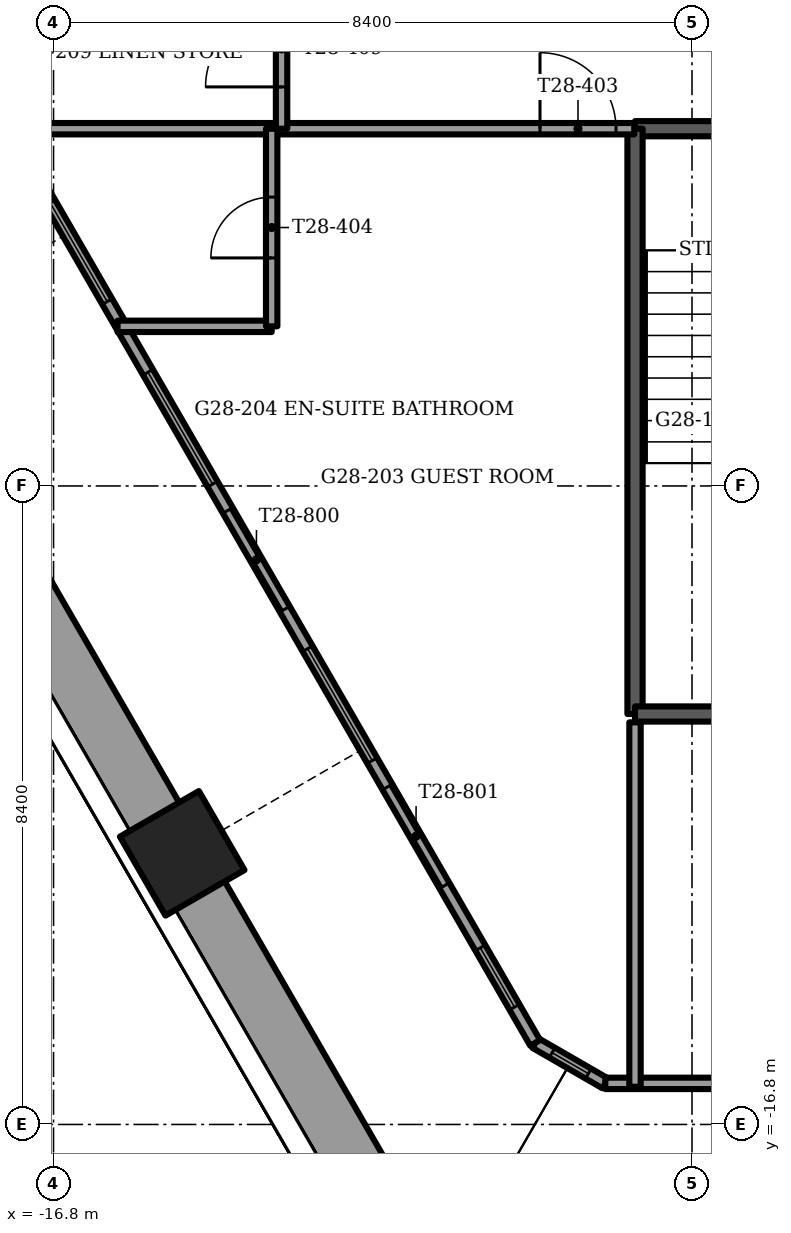
"""IFC4 building model, lengths in metres.
Left out: names, types, materials, properties, quantities, classifications, styles, units other than length and angle.
Written with IfcOpenShell. Run it as: python <this file> out.ifc"""

import sys

from ifc_helpers import new_model, si_unit, direction, frame, frame_2d, origin, origin_2d, place, context, subcontext, project, spatial, rectangle, extrude, element, fill, save


model = new_model("IFC4")
c1 = context("Model", 3, precision=1e-05, world=origin(), true_north=direction((0.0, 1.0)))
c2 = subcontext(c1, "Body", "Model", "MODEL_VIEW")
j1 = project(units=[si_unit("LENGTHUNIT", "METRE"), si_unit("PLANEANGLEUNIT", "RADIAN")], contexts=[c1])
p1 = place(None, origin())
s1 = spatial("IfcSite", under=j1, at=p1, CompositionType="ELEMENT")
p2 = place(p1, origin())
s2 = spatial("IfcBuilding", under=s1, at=p2, CompositionType="ELEMENT")
p3 = place(p2, frame((0.0, 0.0, 116.0)))
s3 = spatial("IfcBuildingStorey", under=s2, at=p3, CompositionType="ELEMENT", Elevation=116.0)
p4 = place(p3, frame((-15.107, -13.233, -1.2), z_axis=(0.0, 0.0, 1.0), x_axis=(-0.5, 0.866025403784, 0.0)))
e1 = element("IfcColumn", 1, at=p4, inside=s3, PredefinedType="COLUMN", context=c2, shape_type="SweptSolid", body=[
    extrude(rectangle(XDim=1.2, YDim=1.2, at=origin_2d()), origin(), (0.0, 0.0, 1.0), 3.75),
])
p5 = place(p3, frame((-18.859, -7.035, 0.0), z_axis=(0.0, 0.0, 1.0), x_axis=(0.499999023957, -0.866025967302, 0.0)))
e2 = element("IfcWall", 2, at=p5, inside=s3, PredefinedType="PARAPET", context=c2, shape_type="SweptSolid", body=[
    extrude(rectangle(XDim=6.673, YDim=0.9, at=frame_2d((3.337, 0.0))), origin(), (0.0, 0.0, 1.0), 1.1),
])
p6 = place(p3, frame((-14.952, -13.802, 0.0), z_axis=(0.0, 0.0, 1.0), x_axis=(0.500008568482, -0.866020456713, 0.0)))
e3 = element("IfcWall", 3, at=p6, inside=s3, PredefinedType="PARAPET", context=c2, shape_type="SweptSolid", body=[
    extrude(rectangle(XDim=5.564, YDim=0.9, at=frame_2d((2.782, 0.0))), origin(), (0.0, 0.0, 1.0), 1.1),
])
p7 = place(p3, frame((-18.852, -1.198, 0.0), z_axis=(0.0, 0.0, 1.0), x_axis=(0.499992448691, -0.866029763491, 0.0)))
e4 = element("IfcWall", 4, at=p7, inside=s3, PredefinedType="SOLIDWALL", context=c2, shape_type="SweptSolid", body=[
    extrude(rectangle(XDim=16.777, YDim=0.15, at=frame_2d((8.388, 0.0))), origin(), (0.0, 0.0, 1.0), 3.45),
])
p8 = place(p7, frame((4.015, 0.0, 0.15)))
e5 = element("IfcOpeningElement", 5, at=p8, cuts=e4, PredefinedType="OPENING", context=c2, shape_type="SweptSolid", body=[
    extrude(rectangle(XDim=1.5, YDim=2.85, at=frame_2d((0.75, 1.425))), frame((0.0, 0.075, 0.0), z_axis=(0.0, -1.0, 0.0), x_axis=(1.0, 0.0, 0.0)), (0.0, 0.0, 1.0), 0.15),
])
p9 = place(p7, frame((6.588, 0.0, 0.15)))
e6 = element("IfcOpeningElement", 6, at=p9, cuts=e4, PredefinedType="OPENING", context=c2, shape_type="SweptSolid", body=[
    extrude(rectangle(XDim=1.7, YDim=2.85, at=frame_2d((0.85, 1.425))), frame((0.0, 0.075, 0.0), z_axis=(0.0, -1.0, 0.0), x_axis=(1.0, 0.0, 0.0)), (0.0, 0.0, 1.0), 0.15),
])
p10 = place(p7, frame((8.688, 0.0, 0.0)))
e7 = element("IfcOpeningElement", 7, at=p10, cuts=e4, PredefinedType="OPENING", context=c2, shape_type="SweptSolid", body=[
    extrude(rectangle(XDim=1.5, YDim=2.4, at=frame_2d((0.75, 1.2))), frame((0.0, 0.075, 0.0), z_axis=(0.0, -1.0, 0.0), x_axis=(1.0, 0.0, 0.0)), (0.0, 0.0, 1.0), 0.15),
])
p11 = place(p7, frame((10.788, 0.0, 0.15)))
e8 = element("IfcOpeningElement", 8, at=p11, cuts=e4, PredefinedType="OPENING", context=c2, shape_type="SweptSolid", body=[
    extrude(rectangle(XDim=1.7, YDim=2.85, at=frame_2d((0.85, 1.425))), frame((0.0, 0.075, 0.0), z_axis=(0.0, -1.0, 0.0), x_axis=(1.0, 0.0, 0.0)), (0.0, 0.0, 1.0), 0.15),
])
p12 = place(p7, frame((12.888, 0.0, 0.0)))
e9 = element("IfcOpeningElement", 9, at=p12, cuts=e4, PredefinedType="OPENING", context=c2, shape_type="SweptSolid", body=[
    extrude(rectangle(XDim=1.5, YDim=2.4, at=frame_2d((0.75, 1.2))), frame((0.0, 0.075, 0.0), z_axis=(0.0, -1.0, 0.0), x_axis=(1.0, 0.0, 0.0)), (0.0, 0.0, 1.0), 0.15),
])
p13 = place(p7, frame((0.863, 0.0, 0.15)))
e10 = element("IfcOpeningElement", 10, at=p13, cuts=e4, PredefinedType="OPENING", context=c2, shape_type="SweptSolid", body=[
    extrude(rectangle(XDim=0.9, YDim=2.73, at=frame_2d((0.45, 1.365))), frame((0.0, 0.075, 0.0), z_axis=(0.0, -1.0, 0.0), x_axis=(1.0, 0.0, 0.0)), (0.0, 0.0, 1.0), 0.15),
])
p14 = place(p7, frame((15.333, 0.0, 0.15)))
e11 = element("IfcOpeningElement", 11, at=p14, cuts=e4, PredefinedType="OPENING", context=c2, shape_type="SweptSolid", body=[
    extrude(rectangle(XDim=0.9, YDim=2.73, at=frame_2d((0.45, 1.365))), frame((0.0, 0.075, 0.0), z_axis=(0.0, -1.0, 0.0), x_axis=(1.0, 0.0, 0.0)), (0.0, 0.0, 1.0), 0.15),
])
p15 = place(p3, frame((-9.541, -16.26, 0.0), z_axis=(0.0, 0.0, 1.0), x_axis=(1.0, 0.0, 0.0)))
e12 = element("IfcWall", 12, at=p15, inside=s3, PredefinedType="SOLIDWALL", context=c2, shape_type="SweptSolid", body=[
    extrude(rectangle(XDim=19.082, YDim=0.15, at=frame_2d((9.541, 0.0))), origin(), (0.0, 0.0, 1.0), 3.45),
])
p16 = place(p15, frame((1.441, 0.0, 0.15)))
e13 = element("IfcOpeningElement", 13, at=p16, cuts=e12, PredefinedType="OPENING", context=c2, shape_type="SweptSolid", body=[
    extrude(rectangle(XDim=1.7, YDim=2.85, at=frame_2d((0.85, 1.425))), frame((0.0, 0.075, 0.0), z_axis=(0.0, -1.0, 0.0), x_axis=(1.0, 0.0, 0.0)), (0.0, 0.0, 1.0), 0.15),
])
p17 = place(p15, frame((5.691, 0.0, 0.15)))
e14 = element("IfcOpeningElement", 14, at=p17, cuts=e12, PredefinedType="OPENING", context=c2, shape_type="SweptSolid", body=[
    extrude(rectangle(XDim=0.9, YDim=2.85, at=frame_2d((0.45, 1.425))), frame((0.0, 0.075, 0.0), z_axis=(0.0, -1.0, 0.0), x_axis=(1.0, 0.0, 0.0)), (0.0, 0.0, 1.0), 0.15),
])
p18 = place(p15, frame((7.141, 0.0, 0.0)))
e15 = element("IfcOpeningElement", 15, at=p18, cuts=e12, PredefinedType="OPENING", context=c2, shape_type="SweptSolid", body=[
    extrude(rectangle(XDim=1.5, YDim=2.4, at=frame_2d((0.75, 1.2))), frame((0.0, 0.075, 0.0), z_axis=(0.0, -1.0, 0.0), x_axis=(1.0, 0.0, 0.0)), (0.0, 0.0, 1.0), 0.15),
])
p19 = place(p15, frame((9.891, 0.0, 0.15)))
e16 = element("IfcOpeningElement", 16, at=p19, cuts=e12, PredefinedType="OPENING", context=c2, shape_type="SweptSolid", body=[
    extrude(rectangle(XDim=1.7, YDim=2.85, at=frame_2d((0.85, 1.425))), frame((0.0, 0.075, 0.0), z_axis=(0.0, -1.0, 0.0), x_axis=(1.0, 0.0, 0.0)), (0.0, 0.0, 1.0), 0.15),
])
p20 = place(p15, frame((11.941, 0.0, 0.0)))
e17 = element("IfcOpeningElement", 17, at=p20, cuts=e12, PredefinedType="OPENING", context=c2, shape_type="SweptSolid", body=[
    extrude(rectangle(XDim=1.5, YDim=2.4, at=frame_2d((0.75, 1.2))), frame((0.0, 0.075, 0.0), z_axis=(0.0, -1.0, 0.0), x_axis=(1.0, 0.0, 0.0)), (0.0, 0.0, 1.0), 0.15),
])
p21 = place(p15, frame((15.691, 0.0, 0.15)))
e18 = element("IfcOpeningElement", 18, at=p21, cuts=e12, PredefinedType="OPENING", context=c2, shape_type="SweptSolid", body=[
    extrude(rectangle(XDim=1.7, YDim=2.85, at=frame_2d((0.85, 1.425))), frame((0.0, 0.075, 0.0), z_axis=(0.0, -1.0, 0.0), x_axis=(1.0, 0.0, 0.0)), (0.0, 0.0, 1.0), 0.15),
])
p22 = place(p3, frame((-10.463, -15.727, 0.0), z_axis=(0.0, 0.0, 1.0), x_axis=(0.866048165231, -0.499960573946, 0.0)))
e19 = element("IfcWall", 19, at=p22, inside=s3, PredefinedType="SOLIDWALL", context=c2, shape_type="SweptSolid", body=[
    extrude(rectangle(XDim=1.065, YDim=0.15, at=frame_2d((0.532, 0.0))), origin(), (0.0, 0.0, 1.0), 3.45),
])
p23 = place(p22, frame((0.258, 0.0, 0.15)))
e20 = element("IfcOpeningElement", 20, at=p23, cuts=e19, PredefinedType="OPENING", context=c2, shape_type="SweptSolid", body=[
    extrude(rectangle(XDim=0.55, YDim=2.85, at=frame_2d((0.275, 1.425))), frame((0.0, 0.075, 0.0), z_axis=(0.0, -1.0, 0.0), x_axis=(1.0, 0.0, 0.0)), (0.0, 0.0, 1.0), 0.15),
])
p24 = place(p3, frame((-9.15, -3.7, -0.3), z_axis=(0.0, 0.0, 1.0), x_axis=(1.0, 0.0, 0.0)))
e21 = element("IfcWall", 21, at=p24, inside=s3, PredefinedType="SOLIDWALL", context=c2, shape_type="SweptSolid", body=[
    extrude(rectangle(XDim=3.35, YDim=0.2, at=frame_2d((1.675, 0.0))), origin(), (0.0, 0.0, 1.0), 3.75),
])
p25 = place(p24, frame((1.125, 0.0, 0.0)))
e22 = element("IfcOpeningElement", 22, at=p25, cuts=e21, PredefinedType="OPENING", context=c2, shape_type="SweptSolid", body=[
    extrude(rectangle(XDim=1.1, YDim=2.1, at=frame_2d((0.55, 1.05))), frame((0.0, 0.1, 0.0), z_axis=(0.0, -1.0, 0.0), x_axis=(1.0, 0.0, 0.0)), (0.0, 0.0, 1.0), 0.2),
])
p26 = place(p3, frame((-9.15, -3.7, -0.3), z_axis=(0.0, 0.0, 1.0), x_axis=(0.0, -1.0, 0.0)))
e23 = element("IfcWall", 23, at=p26, inside=s3, PredefinedType="SOLIDWALL", context=c2, shape_type="SweptSolid", body=[
    extrude(rectangle(XDim=7.7, YDim=0.2, at=frame_2d((3.85, 0.0))), origin(), (0.0, 0.0, 1.0), 3.75),
])
p27 = place(p3, frame((-9.15, -11.4, -0.3), z_axis=(0.0, 0.0, 1.0), x_axis=(1.0, 0.0, 0.0)))
e24 = element("IfcWall", 24, at=p27, inside=s3, PredefinedType="SOLIDWALL", context=c2, shape_type="SweptSolid", body=[
    extrude(rectangle(XDim=3.35, YDim=0.2, at=frame_2d((1.675, 0.0))), origin(), (0.0, 0.0, 1.0), 3.75),
])
p28 = place(p3, frame((-15.958, -6.3, 0.0), z_axis=(0.0, 0.0, 1.0), x_axis=(1.0, 0.0, 0.0)))
e25 = element("IfcWall", 25, at=p28, inside=s3, PredefinedType="PARTITIONING", context=c2, shape_type="SweptSolid", body=[
    extrude(rectangle(XDim=2.028, YDim=0.15, at=frame_2d((1.014, 0.0))), origin(), (0.0, 0.0, 1.0), 3.45),
])
p29 = place(p3, frame((-17.459, -3.7, 0.0), z_axis=(0.0, 0.0, 1.0), x_axis=(1.0, 0.0, 0.0)))
e26 = element("IfcWall", 26, at=p29, inside=s3, PredefinedType="PARTITIONING", context=c2, shape_type="SweptSolid", body=[
    extrude(rectangle(XDim=8.299, YDim=0.15, at=frame_2d((4.149, 0.0))), origin(), (0.0, 0.0, 1.0), 3.45),
])
p30 = place(p29, frame((7.059, 0.0, 0.0)))
e27 = element("IfcOpeningElement", 27, at=p30, cuts=e26, PredefinedType="OPENING", context=c2, shape_type="SweptSolid", body=[
    extrude(rectangle(XDim=1.0, YDim=2.1, at=frame_2d((0.5, 1.05))), frame((0.0, 0.075, 0.0), z_axis=(0.0, -1.0, 0.0), x_axis=(1.0, 0.0, 0.0)), (0.0, 0.0, 1.0), 0.15),
])
p31 = place(p3, frame((-9.15, -16.304, 0.0), z_axis=(0.0, 0.0, 1.0), x_axis=(0.0, 1.0, 0.0)))
e28 = element("IfcWall", 28, at=p31, inside=s3, PredefinedType="PARTITIONING", context=c2, shape_type="SweptSolid", body=[
    extrude(rectangle(XDim=4.794, YDim=0.15, at=frame_2d((2.397, 0.0))), origin(), (0.0, 0.0, 1.0), 3.45),
])
p32 = place(p3, frame((-13.8, -3.7, 0.0), z_axis=(0.0, 0.0, 1.0), x_axis=(0.0, 1.0, 0.0)))
e29 = element("IfcWall", 29, at=p32, inside=s3, PredefinedType="PARTITIONING", context=c2, shape_type="SweptSolid", body=[
    extrude(rectangle(XDim=12.407, YDim=0.15, at=frame_2d((6.204, 0.0))), origin(), (0.0, 0.0, 1.0), 3.45),
])
p33 = place(p32, frame((0.55, 0.0, 0.0)))
e30 = element("IfcOpeningElement", 30, at=p33, cuts=e29, PredefinedType="OPENING", context=c2, shape_type="SweptSolid", body=[
    extrude(rectangle(XDim=1.0, YDim=2.1, at=frame_2d((0.5, 1.05))), frame((0.0, 0.075, 0.0), z_axis=(0.0, -1.0, 0.0), x_axis=(1.0, 0.0, 0.0)), (0.0, 0.0, 1.0), 0.15),
])
p34 = place(p32, frame((2.65, 0.0, 0.0)))
e31 = element("IfcOpeningElement", 31, at=p34, cuts=e29, PredefinedType="OPENING", context=c2, shape_type="SweptSolid", body=[
    extrude(rectangle(XDim=1.0, YDim=2.1, at=frame_2d((0.5, 1.05))), frame((0.0, 0.075, 0.0), z_axis=(0.0, -1.0, 0.0), x_axis=(1.0, 0.0, 0.0)), (0.0, 0.0, 1.0), 0.15),
])
p35 = place(p32, frame((7.683, 0.0, 0.0)))
e32 = element("IfcOpeningElement", 32, at=p35, cuts=e29, PredefinedType="OPENING", context=c2, shape_type="SweptSolid", body=[
    extrude(rectangle(XDim=1.0, YDim=2.1, at=frame_2d((0.5, 1.05))), frame((0.0, 0.075, 0.0), z_axis=(0.0, -1.0, 0.0), x_axis=(1.0, 0.0, 0.0)), (0.0, 0.0, 1.0), 0.15),
])
p36 = place(p3, frame((-13.93, -6.3, 0.0), z_axis=(0.0, 0.0, 1.0), x_axis=(0.0, 1.0, 0.0)))
e33 = element("IfcWall", 33, at=p36, inside=s3, PredefinedType="PARTITIONING", context=c2, shape_type="SweptSolid", body=[
    extrude(rectangle(XDim=2.6, YDim=0.15, at=frame_2d((1.3, 0.0))), origin(), (0.0, 0.0, 1.0), 3.45),
])
p37 = place(p36, frame((0.9, 0.0, 0.0)))
e34 = element("IfcOpeningElement", 34, at=p37, cuts=e33, PredefinedType="OPENING", context=c2, shape_type="SweptSolid", body=[
    extrude(rectangle(XDim=0.8, YDim=2.1, at=frame_2d((0.4, 1.05))), frame((0.0, 0.075, 0.0), z_axis=(0.0, -1.0, 0.0), x_axis=(1.0, 0.0, 0.0)), (0.0, 0.0, 1.0), 0.15),
])
p38 = place(p8, origin())
e35 = element("IfcWindow", 35, at=p38, inside=s3, PartitioningType="SINGLE_PANEL", PredefinedType="WINDOW", context=c2, shape_type="SweptSolid", body=[
    extrude(rectangle(XDim=1.5, YDim=2.85, at=frame_2d((0.75, 1.425))), frame((0.0, 0.03, 0.0), z_axis=(0.0, -1.0, 0.0), x_axis=(1.0, 0.0, 0.0)), (0.0, 0.0, 1.0), 0.06),
])
fill(e5, e35)
p39 = place(p9, origin())
e36 = element("IfcWindow", 36, at=p39, inside=s3, PartitioningType="SINGLE_PANEL", PredefinedType="WINDOW", context=c2, shape_type="SweptSolid", body=[
    extrude(rectangle(XDim=1.7, YDim=2.85, at=frame_2d((0.85, 1.425))), frame((0.0, 0.03, 0.0), z_axis=(0.0, -1.0, 0.0), x_axis=(1.0, 0.0, 0.0)), (0.0, 0.0, 1.0), 0.06),
])
fill(e6, e36)
p40 = place(p10, origin())
e37 = element("IfcDoor", 37, at=p40, inside=s3, OperationType="SLIDING_TO_RIGHT", PredefinedType="DOOR", context=c2, shape_type="SweptSolid", body=[
    extrude(rectangle(XDim=1.5, YDim=2.4, at=frame_2d((0.75, 1.2))), frame((0.0, 0.025, 0.0), z_axis=(0.0, -1.0, 0.0), x_axis=(1.0, 0.0, 0.0)), (0.0, 0.0, 1.0), 0.05),
])
fill(e7, e37)
p41 = place(p11, origin())
e38 = element("IfcWindow", 38, at=p41, inside=s3, PartitioningType="SINGLE_PANEL", PredefinedType="WINDOW", context=c2, shape_type="SweptSolid", body=[
    extrude(rectangle(XDim=1.7, YDim=2.85, at=frame_2d((0.85, 1.425))), frame((0.0, 0.03, 0.0), z_axis=(0.0, -1.0, 0.0), x_axis=(1.0, 0.0, 0.0)), (0.0, 0.0, 1.0), 0.06),
])
fill(e8, e38)
p42 = place(p12, origin())
e39 = element("IfcDoor", 39, at=p42, inside=s3, OperationType="SLIDING_TO_LEFT", PredefinedType="DOOR", context=c2, shape_type="SweptSolid", body=[
    extrude(rectangle(XDim=1.5, YDim=2.4, at=frame_2d((0.75, 1.2))), frame((0.0, 0.025, 0.0), z_axis=(0.0, -1.0, 0.0), x_axis=(1.0, 0.0, 0.0)), (0.0, 0.0, 1.0), 0.05),
])
fill(e9, e39)
p43 = place(p14, origin())
e40 = element("IfcWindow", 40, at=p43, inside=s3, PartitioningType="SINGLE_PANEL", PredefinedType="WINDOW", context=c2, shape_type="SweptSolid", body=[
    extrude(rectangle(XDim=0.9, YDim=2.73, at=frame_2d((0.45, 1.365))), frame((0.0, 0.03, 0.0), z_axis=(0.0, -1.0, 0.0), x_axis=(1.0, 0.0, 0.0)), (0.0, 0.0, 1.0), 0.06),
])
fill(e11, e40)
p44 = place(p23, origin())
e41 = element("IfcWindow", 41, at=p44, inside=s3, PartitioningType="SINGLE_PANEL", PredefinedType="WINDOW", context=c2, shape_type="SweptSolid", body=[
    extrude(rectangle(XDim=0.55, YDim=2.85, at=frame_2d((0.275, 1.425))), frame((0.0, 0.03, 0.0), z_axis=(0.0, -1.0, 0.0), x_axis=(1.0, 0.0, 0.0)), (0.0, 0.0, 1.0), 0.06),
])
fill(e20, e41)
p45 = place(p30, origin())
e42 = element("IfcDoor", 42, at=p45, inside=s3, OperationType="SINGLE_SWING_RIGHT", PredefinedType="DOOR", context=c2, shape_type="SweptSolid", body=[
    extrude(rectangle(XDim=1.0, YDim=2.1, at=frame_2d((0.5, 1.05))), frame((0.0, 0.025, 0.0), z_axis=(0.0, -1.0, 0.0), x_axis=(1.0, 0.0, 0.0)), (0.0, 0.0, 1.0), 0.05),
])
fill(e27, e42)
p46 = place(p37, origin())
e43 = element("IfcDoor", 43, at=p46, inside=s3, OperationType="SINGLE_SWING_RIGHT", PredefinedType="DOOR", context=c2, shape_type="SweptSolid", body=[
    extrude(rectangle(XDim=0.8, YDim=2.1, at=frame_2d((0.4, 1.05))), frame((0.0, 0.025, 0.0), z_axis=(0.0, -1.0, 0.0), x_axis=(1.0, 0.0, 0.0)), (0.0, 0.0, 1.0), 0.05),
])
fill(e34, e43)
p47 = place(p33, origin())
e44 = element("IfcDoor", 44, at=p47, inside=s3, OperationType="SINGLE_SWING_LEFT", PredefinedType="DOOR", context=c2, shape_type="SweptSolid", body=[
    extrude(rectangle(XDim=1.0, YDim=2.1, at=frame_2d((0.5, 1.05))), frame((0.0, 0.025, 0.0), z_axis=(0.0, -1.0, 0.0), x_axis=(1.0, 0.0, 0.0)), (0.0, 0.0, 1.0), 0.05),
])
fill(e30, e44)
save(model, sys.argv[1])
